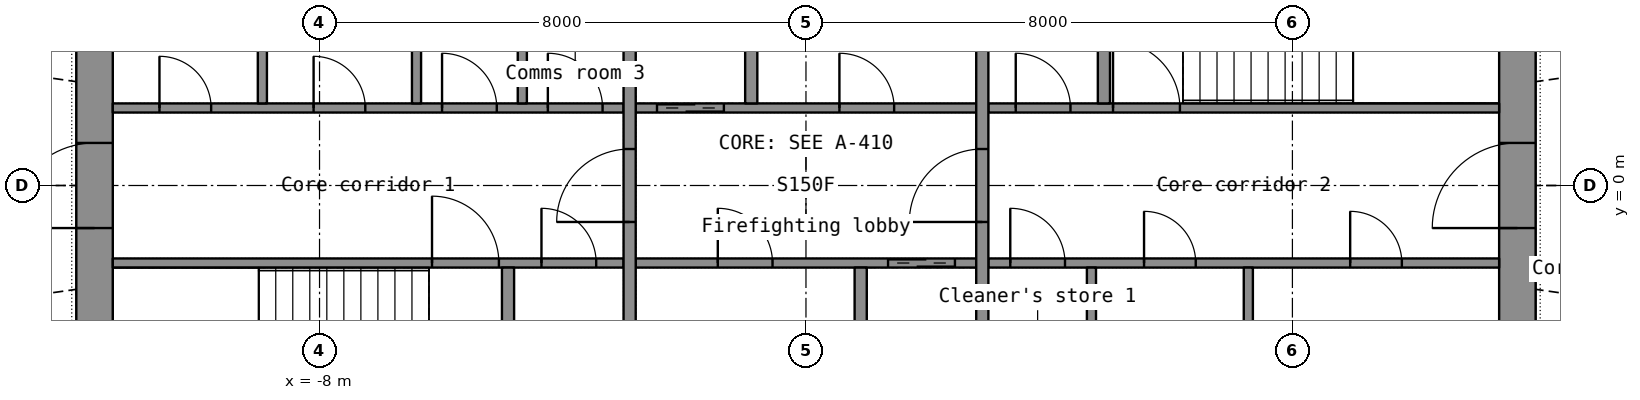
"""IFC4 building model, lengths in metres.
Left out: names, types, materials, properties, quantities, classifications, styles, units other than length and angle.
Written with IfcOpenShell. Run it as: python <this file> out.ifc"""

import sys

from ifc_helpers import new_model, si_unit, direction, frame, frame_2d, origin, place, context, subcontext, project, spatial, rectangle, extrude, element, fill, save


model = new_model("IFC4")
c1 = context("Model", 3, precision=1e-05, world=origin(), true_north=direction((0.0, 1.0)))
c2 = subcontext(c1, "Body", "Model", "MODEL_VIEW")
j1 = project(units=[si_unit("LENGTHUNIT", "METRE"), si_unit("PLANEANGLEUNIT", "RADIAN")], contexts=[c1])
p1 = place(None, origin())
s1 = spatial("IfcSite", under=j1, at=p1, CompositionType="ELEMENT")
p2 = place(p1, origin())
s2 = spatial("IfcBuilding", under=s1, at=p2, CompositionType="ELEMENT")
p3 = place(p2, frame((0.0, 0.0, 63.0)))
s3 = spatial("IfcBuildingStorey", under=s2, at=p3, CompositionType="ELEMENT", Elevation=63.0)
p4 = place(p3, frame((-11.7, -7.2, 0.0), z_axis=(0.0, 0.0, 1.0), x_axis=(0.0, 1.0, 0.0)))
e1 = element("IfcWall", 1, at=p4, inside=s3, PredefinedType="SHEAR", context=c2, shape_type="SweptSolid", body=[
    extrude(rectangle(XDim=14.4, YDim=0.6, at=frame_2d((7.2, 0.0))), origin(), (0.0, 0.0, 1.0), 3.3),
])
p5 = place(p4, frame((6.5, 0.0, 0.0)))
e2 = element("IfcOpeningElement", 2, at=p5, cuts=e1, PredefinedType="OPENING", context=c2, shape_type="SweptSolid", body=[
    extrude(rectangle(XDim=1.4, YDim=2.2, at=frame_2d((0.7, 1.1))), frame((0.0, 0.31, 0.0), z_axis=(0.0, -1.0, 0.0), x_axis=(1.0, 0.0, 0.0)), (0.0, 0.0, 1.0), 0.62),
])
p6 = place(p3, frame((11.7, -7.2, 0.0), z_axis=(0.0, 0.0, 1.0), x_axis=(0.0, 1.0, 0.0)))
e3 = element("IfcWall", 3, at=p6, inside=s3, PredefinedType="SHEAR", context=c2, shape_type="SweptSolid", body=[
    extrude(rectangle(XDim=14.4, YDim=0.6, at=frame_2d((7.2, 0.0))), origin(), (0.0, 0.0, 1.0), 3.3),
])
p7 = place(p6, frame((6.5, 0.0, 0.0)))
e4 = element("IfcOpeningElement", 4, at=p7, cuts=e3, PredefinedType="OPENING", context=c2, shape_type="SweptSolid", body=[
    extrude(rectangle(XDim=1.4, YDim=2.2, at=frame_2d((0.7, 1.1))), frame((0.0, 0.31, 0.0), z_axis=(0.0, -1.0, 0.0), x_axis=(1.0, 0.0, 0.0)), (0.0, 0.0, 1.0), 0.62),
])
p8 = place(p3, frame((-11.4, -1.275, 0.0), z_axis=(0.0, 0.0, 1.0), x_axis=(1.0, 0.0, 0.0)))
e5 = element("IfcWall", 5, at=p8, inside=s3, PredefinedType="SHEAR", context=c2, shape_type="SweptSolid", body=[
    extrude(rectangle(XDim=8.4, YDim=0.15, at=frame_2d((4.2, 0.0))), origin(), (0.0, 0.0, 1.0), 3.3),
])
p9 = place(p8, frame((5.25, 0.0, 0.0)))
e6 = element("IfcOpeningElement", 6, at=p9, cuts=e5, PredefinedType="OPENING", context=c2, shape_type="SweptSolid", body=[
    extrude(rectangle(XDim=1.1, YDim=2.15, at=frame_2d((0.55, 1.075))), frame((0.0, 0.085, 0.0), z_axis=(0.0, -1.0, 0.0), x_axis=(1.0, 0.0, 0.0)), (0.0, 0.0, 1.0), 0.17),
])
p10 = place(p8, frame((7.05, 0.0, 0.0)))
e7 = element("IfcOpeningElement", 7, at=p10, cuts=e5, PredefinedType="OPENING", context=c2, shape_type="SweptSolid", body=[
    extrude(rectangle(XDim=0.9, YDim=2.1, at=frame_2d((0.45, 1.05))), frame((0.0, 0.085, 0.0), z_axis=(0.0, -1.0, 0.0), x_axis=(1.0, 0.0, 0.0)), (0.0, 0.0, 1.0), 0.17),
])
p11 = place(p3, frame((-2.8, -1.275, 0.0), z_axis=(0.0, 0.0, 1.0), x_axis=(1.0, 0.0, 0.0)))
e8 = element("IfcWall", 8, at=p11, inside=s3, PredefinedType="SHEAR", context=c2, shape_type="SweptSolid", body=[
    extrude(rectangle(XDim=5.6, YDim=0.15, at=frame_2d((2.8, 0.0))), origin(), (0.0, 0.0, 1.0), 3.3),
])
p12 = place(p11, frame((4.15, 0.0, 0.0)))
e9 = element("IfcOpeningElement", 9, at=p12, cuts=e8, PredefinedType="OPENING", context=c2, shape_type="SweptSolid", body=[
    extrude(rectangle(XDim=1.1, YDim=2.2, at=frame_2d((0.55, 1.1))), frame((0.0, 0.085, 0.0), z_axis=(0.0, -1.0, 0.0), x_axis=(1.0, 0.0, 0.0)), (0.0, 0.0, 1.0), 0.17),
])
p13 = place(p11, frame((1.35, 0.0, 0.0)))
e10 = element("IfcOpeningElement", 10, at=p13, cuts=e8, PredefinedType="OPENING", context=c2, shape_type="SweptSolid", body=[
    extrude(rectangle(XDim=0.9, YDim=2.1, at=frame_2d((0.45, 1.05))), frame((0.0, 0.085, 0.0), z_axis=(0.0, -1.0, 0.0), x_axis=(1.0, 0.0, 0.0)), (0.0, 0.0, 1.0), 0.17),
])
p14 = place(p3, frame((3.0, -1.275, 0.0), z_axis=(0.0, 0.0, 1.0), x_axis=(1.0, 0.0, 0.0)))
e11 = element("IfcWall", 11, at=p14, inside=s3, PredefinedType="PARTITIONING", context=c2, shape_type="SweptSolid", body=[
    extrude(rectangle(XDim=8.4, YDim=0.15, at=frame_2d((4.2, 0.0))), origin(), (0.0, 0.0, 1.0), 3.3),
])
p15 = place(p14, frame((0.36, 0.0, 0.0)))
e12 = element("IfcOpeningElement", 12, at=p15, cuts=e11, PredefinedType="OPENING", context=c2, shape_type="SweptSolid", body=[
    extrude(rectangle(XDim=0.9, YDim=2.1, at=frame_2d((0.45, 1.05))), frame((0.0, 0.085, 0.0), z_axis=(0.0, -1.0, 0.0), x_axis=(1.0, 0.0, 0.0)), (0.0, 0.0, 1.0), 0.17),
])
p16 = place(p14, frame((2.56, 0.0, 0.0)))
e13 = element("IfcOpeningElement", 13, at=p16, cuts=e11, PredefinedType="OPENING", context=c2, shape_type="SweptSolid", body=[
    extrude(rectangle(XDim=0.85, YDim=2.1, at=frame_2d((0.425, 1.05))), frame((0.0, 0.085, 0.0), z_axis=(0.0, -1.0, 0.0), x_axis=(1.0, 0.0, 0.0)), (0.0, 0.0, 1.0), 0.17),
])
p17 = place(p14, frame((5.95, 0.0, 0.0)))
e14 = element("IfcOpeningElement", 14, at=p17, cuts=e11, PredefinedType="OPENING", context=c2, shape_type="SweptSolid", body=[
    extrude(rectangle(XDim=0.85, YDim=2.1, at=frame_2d((0.425, 1.05))), frame((0.0, 0.085, 0.0), z_axis=(0.0, -1.0, 0.0), x_axis=(1.0, 0.0, 0.0)), (0.0, 0.0, 1.0), 0.17),
])
p18 = place(p3, frame((-11.4, 1.275, 0.0), z_axis=(0.0, 0.0, 1.0), x_axis=(1.0, 0.0, 0.0)))
e15 = element("IfcWall", 15, at=p18, inside=s3, PredefinedType="PARTITIONING", context=c2, shape_type="SweptSolid", body=[
    extrude(rectangle(XDim=8.4, YDim=0.15, at=frame_2d((4.2, 0.0))), origin(), (0.0, 0.0, 1.0), 3.3),
])
p19 = place(p18, frame((0.768, 0.0, 0.0)))
e16 = element("IfcOpeningElement", 16, at=p19, cuts=e15, PredefinedType="OPENING", context=c2, shape_type="SweptSolid", body=[
    extrude(rectangle(XDim=0.85, YDim=2.1, at=frame_2d((0.425, 1.05))), frame((0.0, 0.085, 0.0), z_axis=(0.0, -1.0, 0.0), x_axis=(1.0, 0.0, 0.0)), (0.0, 0.0, 1.0), 0.17),
])
p20 = place(p18, frame((3.302, 0.0, 0.0)))
e17 = element("IfcOpeningElement", 17, at=p20, cuts=e15, PredefinedType="OPENING", context=c2, shape_type="SweptSolid", body=[
    extrude(rectangle(XDim=0.85, YDim=2.1, at=frame_2d((0.425, 1.05))), frame((0.0, 0.085, 0.0), z_axis=(0.0, -1.0, 0.0), x_axis=(1.0, 0.0, 0.0)), (0.0, 0.0, 1.0), 0.17),
])
p21 = place(p18, frame((5.415, 0.0, 0.0)))
e18 = element("IfcOpeningElement", 18, at=p21, cuts=e15, PredefinedType="OPENING", context=c2, shape_type="SweptSolid", body=[
    extrude(rectangle(XDim=0.9, YDim=2.1, at=frame_2d((0.45, 1.05))), frame((0.0, 0.085, 0.0), z_axis=(0.0, -1.0, 0.0), x_axis=(1.0, 0.0, 0.0)), (0.0, 0.0, 1.0), 0.17),
])
p22 = place(p18, frame((7.155, 0.0, 0.0)))
e19 = element("IfcOpeningElement", 19, at=p22, cuts=e15, PredefinedType="OPENING", context=c2, shape_type="SweptSolid", body=[
    extrude(rectangle(XDim=0.9, YDim=2.1, at=frame_2d((0.45, 1.05))), frame((0.0, 0.085, 0.0), z_axis=(0.0, -1.0, 0.0), x_axis=(1.0, 0.0, 0.0)), (0.0, 0.0, 1.0), 0.17),
])
p23 = place(p3, frame((-2.8, 1.275, 0.0), z_axis=(0.0, 0.0, 1.0), x_axis=(1.0, 0.0, 0.0)))
e20 = element("IfcWall", 20, at=p23, inside=s3, PredefinedType="SHEAR", context=c2, shape_type="SweptSolid", body=[
    extrude(rectangle(XDim=5.6, YDim=0.15, at=frame_2d((2.8, 0.0))), origin(), (0.0, 0.0, 1.0), 3.3),
])
p24 = place(p23, frame((0.35, 0.0, 0.0)))
e21 = element("IfcOpeningElement", 21, at=p24, cuts=e20, PredefinedType="OPENING", context=c2, shape_type="SweptSolid", body=[
    extrude(rectangle(XDim=1.1, YDim=2.2, at=frame_2d((0.55, 1.1))), frame((0.0, 0.085, 0.0), z_axis=(0.0, -1.0, 0.0), x_axis=(1.0, 0.0, 0.0)), (0.0, 0.0, 1.0), 0.17),
])
p25 = place(p23, frame((3.35, 0.0, 0.0)))
e22 = element("IfcOpeningElement", 22, at=p25, cuts=e20, PredefinedType="OPENING", context=c2, shape_type="SweptSolid", body=[
    extrude(rectangle(XDim=0.9, YDim=2.1, at=frame_2d((0.45, 1.05))), frame((0.0, 0.085, 0.0), z_axis=(0.0, -1.0, 0.0), x_axis=(1.0, 0.0, 0.0)), (0.0, 0.0, 1.0), 0.17),
])
p26 = place(p3, frame((3.0, 1.275, 0.0), z_axis=(0.0, 0.0, 1.0), x_axis=(1.0, 0.0, 0.0)))
e23 = element("IfcWall", 23, at=p26, inside=s3, PredefinedType="SHEAR", context=c2, shape_type="SweptSolid", body=[
    extrude(rectangle(XDim=8.4, YDim=0.15, at=frame_2d((4.2, 0.0))), origin(), (0.0, 0.0, 1.0), 3.3),
])
p27 = place(p26, frame((2.05, 0.0, 0.0)))
e24 = element("IfcOpeningElement", 24, at=p27, cuts=e23, PredefinedType="OPENING", context=c2, shape_type="SweptSolid", body=[
    extrude(rectangle(XDim=1.1, YDim=2.15, at=frame_2d((0.55, 1.075))), frame((0.0, 0.085, 0.0), z_axis=(0.0, -1.0, 0.0), x_axis=(1.0, 0.0, 0.0)), (0.0, 0.0, 1.0), 0.17),
])
p28 = place(p26, frame((0.45, 0.0, 0.0)))
e25 = element("IfcOpeningElement", 25, at=p28, cuts=e23, PredefinedType="OPENING", context=c2, shape_type="SweptSolid", body=[
    extrude(rectangle(XDim=0.9, YDim=2.1, at=frame_2d((0.45, 1.05))), frame((0.0, 0.085, 0.0), z_axis=(0.0, -1.0, 0.0), x_axis=(1.0, 0.0, 0.0)), (0.0, 0.0, 1.0), 0.17),
])
p29 = place(p3, frame((-2.9, -3.7, 0.0), z_axis=(0.0, 0.0, 1.0), x_axis=(0.0, 1.0, 0.0)))
e26 = element("IfcWall", 26, at=p29, inside=s3, PredefinedType="SHEAR", context=c2, shape_type="SweptSolid", body=[
    extrude(rectangle(XDim=7.4, YDim=0.2, at=frame_2d((3.7, 0.0))), origin(), (0.0, 0.0, 1.0), 3.3),
])
p30 = place(p29, frame((3.1, 0.0, 0.0)))
e27 = element("IfcOpeningElement", 27, at=p30, cuts=e26, PredefinedType="OPENING", context=c2, shape_type="SweptSolid", body=[
    extrude(rectangle(XDim=1.2, YDim=2.2, at=frame_2d((0.6, 1.1))), frame((0.0, 0.11, 0.0), z_axis=(0.0, -1.0, 0.0), x_axis=(1.0, 0.0, 0.0)), (0.0, 0.0, 1.0), 0.22),
])
p31 = place(p3, frame((2.9, -3.7, 0.0), z_axis=(0.0, 0.0, 1.0), x_axis=(0.0, 1.0, 0.0)))
e28 = element("IfcWall", 28, at=p31, inside=s3, PredefinedType="SHEAR", context=c2, shape_type="SweptSolid", body=[
    extrude(rectangle(XDim=7.4, YDim=0.2, at=frame_2d((3.7, 0.0))), origin(), (0.0, 0.0, 1.0), 3.3),
])
p32 = place(p31, frame((3.1, 0.0, 0.0)))
e29 = element("IfcOpeningElement", 29, at=p32, cuts=e28, PredefinedType="OPENING", context=c2, shape_type="SweptSolid", body=[
    extrude(rectangle(XDim=1.2, YDim=2.2, at=frame_2d((0.6, 1.1))), frame((0.0, 0.11, 0.0), z_axis=(0.0, -1.0, 0.0), x_axis=(1.0, 0.0, 0.0)), (0.0, 0.0, 1.0), 0.22),
])
for number, where, z_axis, x_axis in (
    (30, (-0.9, 1.35, 0.0), (0.0, 0.0, 1.0), (0.0, 1.0, 0.0)),
    (31, (0.9, -3.7, 0.0), (0.0, 0.0, 1.0), (0.0, 1.0, 0.0)),
    (32, (-4.9, -3.7, 0.0), (0.0, 0.0, 1.0), (0.0, 1.0, 0.0)),
    (33, (4.9, 1.35, 0.0), (0.0, 0.0, 1.0), (0.0, 1.0, 0.0)),
):
    element("IfcWall", number, at=place(p3, frame(where, z_axis=z_axis, x_axis=x_axis)), inside=s3, PredefinedType="SHEAR", context=c2, shape_type="SweptSolid", body=[
        extrude(rectangle(XDim=2.35, YDim=0.2, at=frame_2d((1.175, 0.0))), origin(), (0.0, 0.0, 1.0), 3.3),
    ])
for number, where, z_axis, x_axis in (
    (34, (-8.94, 1.35, 0.0), (0.0, 0.0, 1.0), (0.0, 1.0, 0.0)),
    (35, (-6.405, 1.35, 0.0), (0.0, 0.0, 1.0), (0.0, 1.0, 0.0)),
    (36, (-4.665, 1.35, 0.0), (0.0, 0.0, 1.0), (0.0, 1.0, 0.0)),
    (37, (4.695, -3.7, 0.0), (0.0, 0.0, 1.0), (0.0, 1.0, 0.0)),
    (38, (7.275, -3.7, 0.0), (0.0, 0.0, 1.0), (0.0, 1.0, 0.0)),
):
    element("IfcWall", number, at=place(p3, frame(where, z_axis=z_axis, x_axis=x_axis)), inside=s3, PredefinedType="PARTITIONING", context=c2, shape_type="SweptSolid", body=[
        extrude(rectangle(XDim=2.35, YDim=0.15, at=frame_2d((1.175, 0.0))), origin(), (0.0, 0.0, 1.0), 3.3),
    ])
p33 = place(p5, origin())
e39 = element("IfcDoor", 39, at=p33, inside=s3, OperationType="DOUBLE_DOOR_SINGLE_SWING", PredefinedType="DOOR", context=c2, shape_type="SweptSolid", body=[
    extrude(rectangle(XDim=1.4, YDim=2.2, at=frame_2d((0.7, 1.1))), frame((0.0, 0.025, 0.0), z_axis=(0.0, -1.0, 0.0), x_axis=(1.0, 0.0, 0.0)), (0.0, 0.0, 1.0), 0.05),
])
fill(e2, e39)
p34 = place(p7, origin())
e40 = element("IfcDoor", 40, at=p34, inside=s3, OperationType="DOUBLE_DOOR_SINGLE_SWING", PredefinedType="DOOR", context=c2, shape_type="SweptSolid", body=[
    extrude(rectangle(XDim=1.4, YDim=2.2, at=frame_2d((0.7, 1.1))), frame((0.0, 0.025, 0.0), z_axis=(0.0, -1.0, 0.0), x_axis=(1.0, 0.0, 0.0)), (0.0, 0.0, 1.0), 0.05),
])
fill(e4, e40)
p35 = place(p30, origin())
e41 = element("IfcDoor", 41, at=p35, inside=s3, OperationType="SINGLE_SWING_LEFT", PredefinedType="DOOR", context=c2, shape_type="SweptSolid", body=[
    extrude(rectangle(XDim=1.2, YDim=2.2, at=frame_2d((0.6, 1.1))), frame((0.0, 0.025, 0.0), z_axis=(0.0, -1.0, 0.0), x_axis=(1.0, 0.0, 0.0)), (0.0, 0.0, 1.0), 0.05),
])
fill(e27, e41)
p36 = place(p32, origin())
e42 = element("IfcDoor", 42, at=p36, inside=s3, OperationType="SINGLE_SWING_LEFT", PredefinedType="DOOR", context=c2, shape_type="SweptSolid", body=[
    extrude(rectangle(XDim=1.2, YDim=2.2, at=frame_2d((0.6, 1.1))), frame((0.0, 0.025, 0.0), z_axis=(0.0, -1.0, 0.0), x_axis=(1.0, 0.0, 0.0)), (0.0, 0.0, 1.0), 0.05),
])
fill(e29, e42)
p37 = place(p24, origin())
e43 = element("IfcDoor", 43, at=p37, inside=s3, OperationType="DOUBLE_DOOR_SLIDING", PredefinedType="DOOR", context=c2, shape_type="SweptSolid", body=[
    extrude(rectangle(XDim=1.1, YDim=2.2, at=frame_2d((0.55, 1.1))), frame((0.0, 0.025, 0.0), z_axis=(0.0, -1.0, 0.0), x_axis=(1.0, 0.0, 0.0)), (0.0, 0.0, 1.0), 0.05),
])
fill(e21, e43)
p38 = place(p12, origin())
e44 = element("IfcDoor", 44, at=p38, inside=s3, OperationType="DOUBLE_DOOR_SLIDING", PredefinedType="DOOR", context=c2, shape_type="SweptSolid", body=[
    extrude(rectangle(XDim=1.1, YDim=2.2, at=frame_2d((0.55, 1.1))), frame((0.0, 0.025, 0.0), z_axis=(0.0, -1.0, 0.0), x_axis=(1.0, 0.0, 0.0)), (0.0, 0.0, 1.0), 0.05),
])
fill(e9, e44)
p39 = place(p9, origin())
e45 = element("IfcDoor", 45, at=p39, inside=s3, OperationType="SINGLE_SWING_LEFT", PredefinedType="DOOR", context=c2, shape_type="SweptSolid", body=[
    extrude(rectangle(XDim=1.1, YDim=2.15, at=frame_2d((0.55, 1.075))), frame((0.0, 0.025, 0.0), z_axis=(0.0, -1.0, 0.0), x_axis=(1.0, 0.0, 0.0)), (0.0, 0.0, 1.0), 0.05),
])
fill(e6, e45)
p40 = place(p27, origin())
e46 = element("IfcDoor", 46, at=p40, inside=s3, OperationType="SINGLE_SWING_LEFT", PredefinedType="DOOR", context=c2, shape_type="SweptSolid", body=[
    extrude(rectangle(XDim=1.1, YDim=2.15, at=frame_2d((0.55, 1.075))), frame((0.0, 0.025, 0.0), z_axis=(0.0, -1.0, 0.0), x_axis=(1.0, 0.0, 0.0)), (0.0, 0.0, 1.0), 0.05),
])
fill(e24, e46)
p41 = place(p19, origin())
e47 = element("IfcDoor", 47, at=p41, inside=s3, OperationType="SINGLE_SWING_LEFT", PredefinedType="DOOR", context=c2, shape_type="SweptSolid", body=[
    extrude(rectangle(XDim=0.85, YDim=2.1, at=frame_2d((0.425, 1.05))), frame((0.0, 0.025, 0.0), z_axis=(0.0, -1.0, 0.0), x_axis=(1.0, 0.0, 0.0)), (0.0, 0.0, 1.0), 0.05),
])
fill(e16, e47)
p42 = place(p20, origin())
e48 = element("IfcDoor", 48, at=p42, inside=s3, OperationType="SINGLE_SWING_LEFT", PredefinedType="DOOR", context=c2, shape_type="SweptSolid", body=[
    extrude(rectangle(XDim=0.85, YDim=2.1, at=frame_2d((0.425, 1.05))), frame((0.0, 0.025, 0.0), z_axis=(0.0, -1.0, 0.0), x_axis=(1.0, 0.0, 0.0)), (0.0, 0.0, 1.0), 0.05),
])
fill(e17, e48)
p43 = place(p21, origin())
e49 = element("IfcDoor", 49, at=p43, inside=s3, OperationType="SINGLE_SWING_LEFT", PredefinedType="DOOR", context=c2, shape_type="SweptSolid", body=[
    extrude(rectangle(XDim=0.9, YDim=2.1, at=frame_2d((0.45, 1.05))), frame((0.0, 0.025, 0.0), z_axis=(0.0, -1.0, 0.0), x_axis=(1.0, 0.0, 0.0)), (0.0, 0.0, 1.0), 0.05),
])
fill(e18, e49)
p44 = place(p22, origin())
e50 = element("IfcDoor", 50, at=p44, inside=s3, OperationType="SINGLE_SWING_LEFT", PredefinedType="DOOR", context=c2, shape_type="SweptSolid", body=[
    extrude(rectangle(XDim=0.9, YDim=2.1, at=frame_2d((0.45, 1.05))), frame((0.0, 0.025, 0.0), z_axis=(0.0, -1.0, 0.0), x_axis=(1.0, 0.0, 0.0)), (0.0, 0.0, 1.0), 0.05),
])
fill(e19, e50)
p45 = place(p15, origin())
e51 = element("IfcDoor", 51, at=p45, inside=s3, OperationType="SINGLE_SWING_LEFT", PredefinedType="DOOR", context=c2, shape_type="SweptSolid", body=[
    extrude(rectangle(XDim=0.9, YDim=2.1, at=frame_2d((0.45, 1.05))), frame((0.0, 0.025, 0.0), z_axis=(0.0, -1.0, 0.0), x_axis=(1.0, 0.0, 0.0)), (0.0, 0.0, 1.0), 0.05),
])
fill(e12, e51)
p46 = place(p16, origin())
e52 = element("IfcDoor", 52, at=p46, inside=s3, OperationType="SINGLE_SWING_LEFT", PredefinedType="DOOR", context=c2, shape_type="SweptSolid", body=[
    extrude(rectangle(XDim=0.85, YDim=2.1, at=frame_2d((0.425, 1.05))), frame((0.0, 0.025, 0.0), z_axis=(0.0, -1.0, 0.0), x_axis=(1.0, 0.0, 0.0)), (0.0, 0.0, 1.0), 0.05),
])
fill(e13, e52)
p47 = place(p17, origin())
e53 = element("IfcDoor", 53, at=p47, inside=s3, OperationType="SINGLE_SWING_LEFT", PredefinedType="DOOR", context=c2, shape_type="SweptSolid", body=[
    extrude(rectangle(XDim=0.85, YDim=2.1, at=frame_2d((0.425, 1.05))), frame((0.0, 0.025, 0.0), z_axis=(0.0, -1.0, 0.0), x_axis=(1.0, 0.0, 0.0)), (0.0, 0.0, 1.0), 0.05),
])
fill(e14, e53)
p48 = place(p25, origin())
e54 = element("IfcDoor", 54, at=p48, inside=s3, OperationType="SINGLE_SWING_LEFT", PredefinedType="DOOR", context=c2, shape_type="SweptSolid", body=[
    extrude(rectangle(XDim=0.9, YDim=2.1, at=frame_2d((0.45, 1.05))), frame((0.0, 0.025, 0.0), z_axis=(0.0, -1.0, 0.0), x_axis=(1.0, 0.0, 0.0)), (0.0, 0.0, 1.0), 0.05),
])
fill(e22, e54)
p49 = place(p13, origin())
e55 = element("IfcDoor", 55, at=p49, inside=s3, OperationType="SINGLE_SWING_LEFT", PredefinedType="DOOR", context=c2, shape_type="SweptSolid", body=[
    extrude(rectangle(XDim=0.9, YDim=2.1, at=frame_2d((0.45, 1.05))), frame((0.0, 0.025, 0.0), z_axis=(0.0, -1.0, 0.0), x_axis=(1.0, 0.0, 0.0)), (0.0, 0.0, 1.0), 0.05),
])
fill(e10, e55)
p50 = place(p28, origin())
e56 = element("IfcDoor", 56, at=p50, inside=s3, OperationType="SINGLE_SWING_LEFT", PredefinedType="DOOR", context=c2, shape_type="SweptSolid", body=[
    extrude(rectangle(XDim=0.9, YDim=2.1, at=frame_2d((0.45, 1.05))), frame((0.0, 0.025, 0.0), z_axis=(0.0, -1.0, 0.0), x_axis=(1.0, 0.0, 0.0)), (0.0, 0.0, 1.0), 0.05),
])
fill(e25, e56)
p51 = place(p10, origin())
e57 = element("IfcDoor", 57, at=p51, inside=s3, OperationType="SINGLE_SWING_LEFT", PredefinedType="DOOR", context=c2, shape_type="SweptSolid", body=[
    extrude(rectangle(XDim=0.9, YDim=2.1, at=frame_2d((0.45, 1.05))), frame((0.0, 0.025, 0.0), z_axis=(0.0, -1.0, 0.0), x_axis=(1.0, 0.0, 0.0)), (0.0, 0.0, 1.0), 0.05),
])
fill(e7, e57)
save(model, sys.argv[1])
